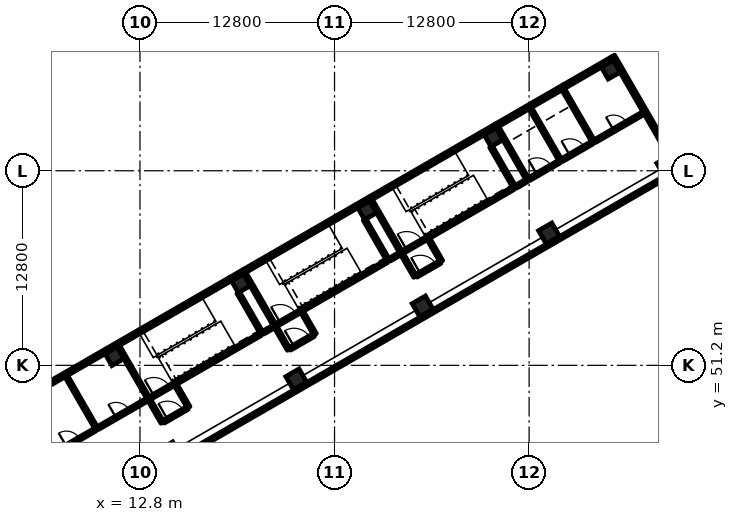
"""IFC4 building model, lengths in metres.
Left out: names, types, materials, properties, quantities, classifications, styles, units other than length and angle.
Written with IfcOpenShell. Run it as: python <this file> out.ifc"""

import sys

from ifc_helpers import new_model, si_unit, direction, frame, frame_2d, origin, origin_2d, place, context, subcontext, project, spatial, rectangle, extrude, element, fill, save


model = new_model("IFC4")
c1 = context("Model", 3, precision=1e-05, world=origin(), true_north=direction((0.0, 1.0)))
c2 = subcontext(c1, "Body", "Model", "MODEL_VIEW")
j1 = project(units=[si_unit("LENGTHUNIT", "METRE"), si_unit("PLANEANGLEUNIT", "RADIAN")], contexts=[c1])
p1 = place(None, origin())
s1 = spatial("IfcSite", under=j1, at=p1, CompositionType="ELEMENT")
p2 = place(p1, origin())
s2 = spatial("IfcBuilding", under=s1, at=p2, CompositionType="ELEMENT")
p3 = place(p2, frame((0.0, 0.0, 16.2)))
s3 = spatial("IfcBuildingStorey", under=s2, at=p3, CompositionType="ELEMENT", Elevation=16.2)
for number, where, z_axis, x_axis in (
    (1, (23.082, 50.277, 0.0), (0.0, 0.0, 1.0), (-0.5, 0.866, 0.0)),
    (2, (31.396, 55.077, 0.0), (0.0, 0.0, 1.0), (-0.5, 0.866, 0.0)),
    (3, (39.71, 59.877, 0.0), (0.0, 0.0, 1.0), (-0.5, 0.866, 0.0)),
):
    element("IfcColumn", number, at=place(p3, frame(where, z_axis=z_axis, x_axis=x_axis)), inside=s3, PredefinedType="COLUMN", context=c2, shape_type="SweptSolid", body=[
        extrude(rectangle(XDim=1.0, YDim=1.0, at=origin_2d()), origin(), (0.0, 0.0, 1.0), 5.4),
    ])
for number, where, z_axis, x_axis in (
    (4, (47.417, 64.327, 0.0), (0.0, 0.0, 1.0), (-0.5, 0.866, 0.0)),
    (5, (11.118, 51.799, 0.0), (0.0, 0.0, 1.0), (-0.5, 0.866, 0.0)),
    (6, (19.432, 56.599, 0.0), (0.0, 0.0, 1.0), (-0.5, 0.866, 0.0)),
    (7, (27.746, 61.399, 0.0), (0.0, 0.0, 1.0), (-0.5, 0.866, 0.0)),
    (8, (36.06, 66.199, 0.0), (0.0, 0.0, 1.0), (-0.5, 0.866, 0.0)),
    (9, (43.767, 70.649, 0.0), (0.0, 0.0, 1.0), (-0.5, 0.866, 0.0)),
):
    element("IfcColumn", number, at=place(p3, frame(where, z_axis=z_axis, x_axis=x_axis)), inside=s3, PredefinedType="COLUMN", context=c2, shape_type="SweptSolid", body=[
        extrude(rectangle(XDim=0.9, YDim=0.9, at=origin_2d()), origin(), (0.0, 0.0, 1.0), 5.4),
    ])
p4 = place(p3, frame((43.915, 71.542, 0.0), z_axis=(0.0, 0.0, 1.0), x_axis=(0.499999331568, -0.866025789703, 0.0)))
e10 = element("IfcWall", 10, at=p4, inside=s3, PredefinedType="SOLIDWALL", context=c2, shape_type="SweptSolid", body=[
    extrude(rectangle(XDim=8.625, YDim=0.25, at=frame_2d((4.312, 0.0))), origin(), (0.0, 0.0, 1.0), 5.0),
])
p5 = place(p3, frame((2.733, 47.622, 0.0), z_axis=(0.0, 0.0, 1.0), x_axis=(0.866025598446, 0.499999662836, 0.0)))
e11 = element("IfcWall", 11, at=p5, inside=s3, PredefinedType="SOLIDWALL", context=c2, shape_type="SweptSolid", body=[
    extrude(rectangle(XDim=18.5, YDim=0.25, at=frame_2d((9.25, 0.0))), origin(), (0.0, 0.0, 1.0), 5.0),
])
p6 = place(p3, frame((19.621, 57.372, 0.0), z_axis=(0.0, 0.0, 1.0), x_axis=(0.866021068297, 0.500007509209, 0.0)))
e12 = element("IfcWall", 12, at=p6, inside=s3, PredefinedType="SOLIDWALL", context=c2, shape_type="SweptSolid", body=[
    extrude(rectangle(XDim=8.6, YDim=0.25, at=frame_2d((4.3, 0.0))), origin(), (0.0, 0.0, 1.0), 5.0),
])
p7 = place(p3, frame((27.935, 62.172, 0.0), z_axis=(0.0, 0.0, 1.0), x_axis=(0.86604045752, 0.499973925258, 0.0)))
e13 = element("IfcWall", 13, at=p7, inside=s3, PredefinedType="SOLIDWALL", context=c2, shape_type="SweptSolid", body=[
    extrude(rectangle(XDim=8.6, YDim=0.25, at=frame_2d((4.3, 0.0))), origin(), (0.0, 0.0, 1.0), 5.0),
])
p8 = place(p3, frame((36.249, 66.972, 0.0), z_axis=(0.0, 0.0, 1.0), x_axis=(0.866009661879, 0.500027264788, 0.0)))
e14 = element("IfcWall", 14, at=p8, inside=s3, PredefinedType="SOLIDWALL", context=c2, shape_type="SweptSolid", body=[
    extrude(rectangle(XDim=5.2, YDim=0.25, at=frame_2d((2.6, 0.0))), origin(), (0.0, 0.0, 1.0), 5.0),
])
p9 = place(p3, frame((40.752, 69.572, 0.0), z_axis=(0.0, 0.0, 1.0), x_axis=(0.866018442252, 0.500012057535, 0.0)))
e15 = element("IfcWall", 15, at=p9, inside=s3, PredefinedType="SOLIDWALL", context=c2, shape_type="SweptSolid", body=[
    extrude(rectangle(XDim=3.6, YDim=0.25, at=frame_2d((1.8, 0.0))), origin(), (0.0, 0.0, 1.0), 5.0),
])
p10 = place(p9, frame((0.25, 0.0, 0.9)))
e16 = element("IfcOpeningElement", 16, at=p10, cuts=e15, PredefinedType="OPENING", context=c2, shape_type="SweptSolid", body=[
    extrude(rectangle(XDim=2.0, YDim=1.8, at=frame_2d((1.0, 0.9))), frame((0.0, 0.135, 0.0), z_axis=(0.0, -1.0, 0.0), x_axis=(1.0, 0.0, 0.0)), (0.0, 0.0, 1.0), 0.27),
])
for number, where, z_axis, x_axis in (
    (17, (18.755, 56.872, 0.0), (0.0, 0.0, 1.0), (0.866, 0.5, 0.0)),
    (18, (27.069, 61.672, 0.0), (0.0, 0.0, 1.0), (0.866, 0.5, 0.0)),
    (19, (35.383, 66.472, 0.0), (0.0, 0.0, 1.0), (0.866, 0.5, 0.0)),
):
    element("IfcWall", number, at=place(p3, frame(where, z_axis=z_axis, x_axis=x_axis)), inside=s3, PredefinedType="SOLIDWALL", context=c2, shape_type="SweptSolid", body=[
        extrude(rectangle(XDim=1.0, YDim=0.25, at=frame_2d((0.5, 0.0))), origin(), (0.0, 0.0, 1.0), 5.0),
    ])
p11 = place(p3, frame((13.369, 49.0, 0.0), z_axis=(0.0, 0.0, 1.0), x_axis=(-0.50002537861, 0.866010750942, 0.0)))
e20 = element("IfcWall", 20, at=p11, inside=s3, PredefinedType="SOLIDWALL", context=c2, shape_type="SweptSolid", body=[
    extrude(rectangle(XDim=4.0, YDim=0.2, at=frame_2d((2.0, 0.0))), origin(), (0.0, 0.0, 1.0), 5.0),
])
p12 = place(p3, frame((20.817, 53.299, 0.0), z_axis=(0.0, 0.0, 1.0), x_axis=(-0.49999285859, 0.86602952684, 0.0)))
e21 = element("IfcWall", 21, at=p12, inside=s3, PredefinedType="SOLIDWALL", context=c2, shape_type="SweptSolid", body=[
    extrude(rectangle(XDim=3.1, YDim=0.2, at=frame_2d((1.55, 0.0))), origin(), (0.0, 0.0, 1.0), 5.0),
])
p13 = place(p3, frame((21.683, 53.799, 0.0), z_axis=(0.0, 0.0, 1.0), x_axis=(-0.49999894854, 0.866026010844, 0.0)))
e22 = element("IfcWall", 22, at=p13, inside=s3, PredefinedType="SOLIDWALL", context=c2, shape_type="SweptSolid", body=[
    extrude(rectangle(XDim=4.0, YDim=0.2, at=frame_2d((2.0, 0.0))), origin(), (0.0, 0.0, 1.0), 5.0),
])
p14 = place(p3, frame((29.131, 58.099, 0.0), z_axis=(0.0, 0.0, 1.0), x_axis=(-0.49999285859, 0.86602952684, 0.0)))
e23 = element("IfcWall", 23, at=p14, inside=s3, PredefinedType="SOLIDWALL", context=c2, shape_type="SweptSolid", body=[
    extrude(rectangle(XDim=3.1, YDim=0.2, at=frame_2d((1.55, 0.0))), origin(), (0.0, 0.0, 1.0), 5.0),
])
p15 = place(p3, frame((29.997, 58.599, 0.0), z_axis=(0.0, 0.0, 1.0), x_axis=(-0.49999894854, 0.866026010844, 0.0)))
e24 = element("IfcWall", 24, at=p15, inside=s3, PredefinedType="SOLIDWALL", context=c2, shape_type="SweptSolid", body=[
    extrude(rectangle(XDim=4.0, YDim=0.2, at=frame_2d((2.0, 0.0))), origin(), (0.0, 0.0, 1.0), 5.0),
])
p16 = place(p3, frame((37.445, 62.899, 0.0), z_axis=(0.0, 0.0, 1.0), x_axis=(-0.500026960575, 0.86600983753, 0.0)))
e25 = element("IfcWall", 25, at=p16, inside=s3, PredefinedType="SOLIDWALL", context=c2, shape_type="SweptSolid", body=[
    extrude(rectangle(XDim=3.1, YDim=0.2, at=frame_2d((1.55, 0.0))), origin(), (0.0, 0.0, 1.0), 5.0),
])
p17 = place(p3, frame((13.456, 49.049, 0.0), z_axis=(0.0, 0.0, 1.0), x_axis=(0.866036909293, 0.499980071345, 0.0)))
e26 = element("IfcWall", 26, at=p17, inside=s3, PredefinedType="SOLIDWALL", context=c2, shape_type="SweptSolid", body=[
    extrude(rectangle(XDim=1.75, YDim=0.2, at=frame_2d((0.875, 0.0))), origin(), (0.0, 0.0, 1.0), 5.0),
])
p18 = place(p17, frame((0.3, 0.0, 0.0)))
e27 = element("IfcOpeningElement", 27, at=p18, cuts=e26, PredefinedType="OPENING", context=c2, shape_type="SweptSolid", body=[
    extrude(rectangle(XDim=1.2, YDim=2.1, at=frame_2d((0.6, 1.05))), frame((0.0, 0.11, 0.0), z_axis=(0.0, -1.0, 0.0), x_axis=(1.0, 0.0, 0.0)), (0.0, 0.0, 1.0), 0.22),
])
p19 = place(p3, frame((14.972, 49.924, 0.0), z_axis=(0.0, 0.0, 1.0), x_axis=(0.86601134256, 0.500024353964, 0.0)))
e28 = element("IfcWall", 28, at=p19, inside=s3, PredefinedType="SOLIDWALL", context=c2, shape_type="SweptSolid", body=[
    extrude(rectangle(XDim=6.65, YDim=0.2, at=frame_2d((3.325, 0.0))), origin(), (0.0, 0.0, 1.0), 5.0),
])
p20 = place(p3, frame((21.77, 53.849, 0.0), z_axis=(0.0, 0.0, 1.0), x_axis=(0.866002029911, 0.500040482552, 0.0)))
e29 = element("IfcWall", 29, at=p20, inside=s3, PredefinedType="SOLIDWALL", context=c2, shape_type="SweptSolid", body=[
    extrude(rectangle(XDim=1.75, YDim=0.2, at=frame_2d((0.875, 0.0))), origin(), (0.0, 0.0, 1.0), 5.0),
])
p21 = place(p20, frame((0.3, 0.0, 0.0)))
e30 = element("IfcOpeningElement", 30, at=p21, cuts=e29, PredefinedType="OPENING", context=c2, shape_type="SweptSolid", body=[
    extrude(rectangle(XDim=1.2, YDim=2.1, at=frame_2d((0.6, 1.05))), frame((0.0, 0.11, 0.0), z_axis=(0.0, -1.0, 0.0), x_axis=(1.0, 0.0, 0.0)), (0.0, 0.0, 1.0), 0.22),
])
p22 = place(p3, frame((23.285, 54.724, 0.0), z_axis=(0.0, 0.0, 1.0), x_axis=(0.866027239912, 0.49999681972, 0.0)))
e31 = element("IfcWall", 31, at=p22, inside=s3, PredefinedType="SOLIDWALL", context=c2, shape_type="SweptSolid", body=[
    extrude(rectangle(XDim=6.65, YDim=0.2, at=frame_2d((3.325, 0.0))), origin(), (0.0, 0.0, 1.0), 5.0),
])
p23 = place(p3, frame((30.084, 58.649, 0.0), z_axis=(0.0, 0.0, 1.0), x_axis=(0.866036909293, 0.499980071345, 0.0)))
e32 = element("IfcWall", 32, at=p23, inside=s3, PredefinedType="SOLIDWALL", context=c2, shape_type="SweptSolid", body=[
    extrude(rectangle(XDim=1.75, YDim=0.2, at=frame_2d((0.875, 0.0))), origin(), (0.0, 0.0, 1.0), 5.0),
])
p24 = place(p23, frame((0.3, 0.0, 0.0)))
e33 = element("IfcOpeningElement", 33, at=p24, cuts=e32, PredefinedType="OPENING", context=c2, shape_type="SweptSolid", body=[
    extrude(rectangle(XDim=1.2, YDim=2.1, at=frame_2d((0.6, 1.05))), frame((0.0, 0.11, 0.0), z_axis=(0.0, -1.0, 0.0), x_axis=(1.0, 0.0, 0.0)), (0.0, 0.0, 1.0), 0.22),
])
p25 = place(p3, frame((31.599, 59.524, 0.0), z_axis=(0.0, 0.0, 1.0), x_axis=(0.866027239912, 0.49999681972, 0.0)))
e34 = element("IfcWall", 34, at=p25, inside=s3, PredefinedType="SOLIDWALL", context=c2, shape_type="SweptSolid", body=[
    extrude(rectangle(XDim=6.65, YDim=0.2, at=frame_2d((3.325, 0.0))), origin(), (0.0, 0.0, 1.0), 5.0),
])
for number, where, z_axis, x_axis in (
    (35, (38.311, 63.399, 0.0), (0.0, 0.0, 1.0), (-0.5, 0.866, 0.0)),
    (36, (40.476, 64.649, 0.0), (0.0, 0.0, 1.0), (-0.5, 0.866, 0.0)),
    (37, (42.641, 65.899, 0.0), (0.0, 0.0, 1.0), (-0.5, 0.866, 0.0)),
):
    element("IfcWall", number, at=place(p3, frame(where, z_axis=z_axis, x_axis=x_axis)), inside=s3, PredefinedType="SOLIDWALL", context=c2, shape_type="SweptSolid", body=[
        extrude(rectangle(XDim=4.0, YDim=0.2, at=frame_2d((2.0, 0.0))), origin(), (0.0, 0.0, 1.0), 5.0),
    ])
p26 = place(p3, frame((38.398, 63.449, 0.0), z_axis=(0.0, 0.0, 1.0), x_axis=(0.86602648383, 0.499998129301, 0.0)))
e38 = element("IfcWall", 38, at=p26, inside=s3, PredefinedType="SOLIDWALL", context=c2, shape_type="SweptSolid", body=[
    extrude(rectangle(XDim=2.3, YDim=0.2, at=frame_2d((1.15, 0.0))), origin(), (0.0, 0.0, 1.0), 5.0),
])
p27 = place(p26, frame((0.6, 0.0, 0.0)))
e39 = element("IfcOpeningElement", 39, at=p27, cuts=e38, PredefinedType="OPENING", context=c2, shape_type="SweptSolid", body=[
    extrude(rectangle(XDim=1.1, YDim=2.1, at=frame_2d((0.55, 1.05))), frame((0.0, 0.11, 0.0), z_axis=(0.0, -1.0, 0.0), x_axis=(1.0, 0.0, 0.0)), (0.0, 0.0, 1.0), 0.22),
])
p28 = place(p3, frame((40.563, 64.699, 0.0), z_axis=(0.0, 0.0, 1.0), x_axis=(0.86602648383, 0.499998129301, 0.0)))
e40 = element("IfcWall", 40, at=p28, inside=s3, PredefinedType="SOLIDWALL", context=c2, shape_type="SweptSolid", body=[
    extrude(rectangle(XDim=2.3, YDim=0.2, at=frame_2d((1.15, 0.0))), origin(), (0.0, 0.0, 1.0), 5.0),
])
p29 = place(p28, frame((0.6, 0.0, 0.0)))
e41 = element("IfcOpeningElement", 41, at=p29, cuts=e40, PredefinedType="OPENING", context=c2, shape_type="SweptSolid", body=[
    extrude(rectangle(XDim=1.1, YDim=2.1, at=frame_2d((0.55, 1.05))), frame((0.0, 0.11, 0.0), z_axis=(0.0, -1.0, 0.0), x_axis=(1.0, 0.0, 0.0)), (0.0, 0.0, 1.0), 0.22),
])
for number, where, z_axis, x_axis in (
    (42, (14.27, 47.441, 0.0), (0.0, 0.0, 1.0), (-0.5, 0.866, 0.0)),
    (43, (16.001, 48.441, 0.0), (0.0, 0.0, 1.0), (-0.5, 0.866, 0.0)),
    (44, (22.583, 52.24, 0.0), (0.0, 0.0, 1.0), (-0.5, 0.866, 0.0)),
):
    element("IfcWall", number, at=place(p3, frame(where, z_axis=z_axis, x_axis=x_axis)), inside=s3, PredefinedType="PARTITIONING", context=c2, shape_type="SweptSolid", body=[
        extrude(rectangle(XDim=1.7, YDim=0.2, at=frame_2d((0.85, 0.0))), origin(), (0.0, 0.0, 1.0), 4.1),
    ])
p30 = place(p3, frame((24.315, 53.24, 0.0), z_axis=(0.0, 0.0, 1.0), x_axis=(-0.500000056704, 0.866025371046, 0.0)))
e45 = element("IfcWall", 45, at=p30, inside=s3, PredefinedType="PARTITIONING", context=c2, shape_type="SweptSolid", body=[
    extrude(rectangle(XDim=1.7, YDim=0.2, at=frame_2d((0.85, 0.0))), origin(), (0.0, 0.0, 1.0), 4.1),
])
for number, where, z_axis, x_axis in (
    (46, (30.897, 57.041, 0.0), (0.0, 0.0, 1.0), (-0.5, 0.866, 0.0)),
    (47, (32.629, 58.041, 0.0), (0.0, 0.0, 1.0), (-0.5, 0.866, 0.0)),
):
    element("IfcWall", number, at=place(p3, frame(where, z_axis=z_axis, x_axis=x_axis)), inside=s3, PredefinedType="PARTITIONING", context=c2, shape_type="SweptSolid", body=[
        extrude(rectangle(XDim=1.7, YDim=0.2, at=frame_2d((0.85, 0.0))), origin(), (0.0, 0.0, 1.0), 4.1),
    ])
p31 = place(p3, frame((14.356, 47.49, 0.0), z_axis=(0.0, 0.0, 1.0), x_axis=(0.865955154139, 0.50012165622, 0.0)))
e48 = element("IfcWall", 48, at=p31, inside=s3, PredefinedType="PARTITIONING", context=c2, shape_type="SweptSolid", body=[
    extrude(rectangle(XDim=1.8, YDim=0.2, at=frame_2d((0.9, 0.0))), origin(), (0.0, 0.0, 1.0), 4.1),
])
p32 = place(p31, frame((0.3, 0.0, 0.0)))
e49 = element("IfcOpeningElement", 49, at=p32, cuts=e48, PredefinedType="OPENING", context=c2, shape_type="SweptSolid", body=[
    extrude(rectangle(XDim=1.2, YDim=2.1, at=frame_2d((0.6, 1.05))), frame((0.0, 0.11, 0.0), z_axis=(0.0, -1.0, 0.0), x_axis=(1.0, 0.0, 0.0)), (0.0, 0.0, 1.0), 0.22),
])
p33 = place(p3, frame((22.67, 52.291, 0.0), z_axis=(0.0, 0.0, 1.0), x_axis=(0.865989075817, 0.500062916607, 0.0)))
e50 = element("IfcWall", 50, at=p33, inside=s3, PredefinedType="PARTITIONING", context=c2, shape_type="SweptSolid", body=[
    extrude(rectangle(XDim=1.8, YDim=0.2, at=frame_2d((0.9, 0.0))), origin(), (0.0, 0.0, 1.0), 4.1),
])
p34 = place(p33, frame((0.3, 0.0, 0.0)))
e51 = element("IfcOpeningElement", 51, at=p34, cuts=e50, PredefinedType="OPENING", context=c2, shape_type="SweptSolid", body=[
    extrude(rectangle(XDim=1.2, YDim=2.1, at=frame_2d((0.6, 1.05))), frame((0.0, 0.11, 0.0), z_axis=(0.0, -1.0, 0.0), x_axis=(1.0, 0.0, 0.0)), (0.0, 0.0, 1.0), 0.22),
])
p35 = place(p3, frame((30.984, 57.091, 0.0), z_axis=(0.0, 0.0, 1.0), x_axis=(0.866047807691, 0.499961193289, 0.0)))
e52 = element("IfcWall", 52, at=p35, inside=s3, PredefinedType="PARTITIONING", context=c2, shape_type="SweptSolid", body=[
    extrude(rectangle(XDim=1.8, YDim=0.2, at=frame_2d((0.9, 0.0))), origin(), (0.0, 0.0, 1.0), 4.1),
])
p36 = place(p35, frame((0.3, 0.0, 0.0)))
e53 = element("IfcOpeningElement", 53, at=p36, cuts=e52, PredefinedType="OPENING", context=c2, shape_type="SweptSolid", body=[
    extrude(rectangle(XDim=1.2, YDim=2.1, at=frame_2d((0.6, 1.05))), frame((0.0, 0.11, 0.0), z_axis=(0.0, -1.0, 0.0), x_axis=(1.0, 0.0, 0.0)), (0.0, 0.0, 1.0), 0.22),
])
p37 = place(p3, frame((9.949, 47.024, 0.0), z_axis=(0.0, 0.0, 1.0), x_axis=(-0.49999894854, 0.866026010844, 0.0)))
e54 = element("IfcWall", 54, at=p37, inside=s3, PredefinedType="PARTITIONING", context=c2, shape_type="SweptSolid", body=[
    extrude(rectangle(XDim=4.0, YDim=0.2, at=frame_2d((2.0, 0.0))), origin(), (0.0, 0.0, 1.0), 4.1),
])
p38 = place(p3, frame((6.917, 45.274, 0.0), z_axis=(0.0, 0.0, 1.0), x_axis=(0.866038511948, 0.499977295307, 0.0)))
e55 = element("IfcWall", 55, at=p38, inside=s3, PredefinedType="PARTITIONING", context=c2, shape_type="SweptSolid", body=[
    extrude(rectangle(XDim=3.4, YDim=0.2, at=frame_2d((1.7, 0.0))), origin(), (0.0, 0.0, 1.0), 4.1),
])
p39 = place(p38, frame((1.2, 0.0, 0.0)))
e56 = element("IfcOpeningElement", 56, at=p39, cuts=e55, PredefinedType="OPENING", context=c2, shape_type="SweptSolid", body=[
    extrude(rectangle(XDim=1.0, YDim=2.1, at=frame_2d((0.5, 1.05))), frame((0.0, 0.11, 0.0), z_axis=(0.0, -1.0, 0.0), x_axis=(1.0, 0.0, 0.0)), (0.0, 0.0, 1.0), 0.22),
])
p40 = place(p3, frame((10.035, 47.074, 0.0), z_axis=(0.0, 0.0, 1.0), x_axis=(0.866022959057, 0.500004234368, 0.0)))
e57 = element("IfcWall", 57, at=p40, inside=s3, PredefinedType="PARTITIONING", context=c2, shape_type="SweptSolid", body=[
    extrude(rectangle(XDim=3.75, YDim=0.2, at=frame_2d((1.875, 0.0))), origin(), (0.0, 0.0, 1.0), 4.1),
])
p41 = place(p40, frame((1.375, 0.0, 0.0)))
e58 = element("IfcOpeningElement", 58, at=p41, cuts=e57, PredefinedType="OPENING", context=c2, shape_type="SweptSolid", body=[
    extrude(rectangle(XDim=1.0, YDim=2.1, at=frame_2d((0.5, 1.05))), frame((0.0, 0.11, 0.0), z_axis=(0.0, -1.0, 0.0), x_axis=(1.0, 0.0, 0.0)), (0.0, 0.0, 1.0), 0.22),
])
p42 = place(p3, frame((42.728, 65.949, 0.0), z_axis=(0.0, 0.0, 1.0), x_axis=(0.866029545028, 0.499992827086, 0.0)))
e59 = element("IfcWall", 59, at=p42, inside=s3, PredefinedType="PARTITIONING", context=c2, shape_type="SweptSolid", body=[
    extrude(rectangle(XDim=3.7, YDim=0.2, at=frame_2d((1.85, 0.0))), origin(), (0.0, 0.0, 1.0), 4.1),
])
p43 = place(p42, frame((1.425, 0.0, 0.0)))
e60 = element("IfcOpeningElement", 60, at=p43, cuts=e59, PredefinedType="OPENING", context=c2, shape_type="SweptSolid", body=[
    extrude(rectangle(XDim=1.0, YDim=2.1, at=frame_2d((0.5, 1.05))), frame((0.0, 0.11, 0.0), z_axis=(0.0, -1.0, 0.0), x_axis=(1.0, 0.0, 0.0)), (0.0, 0.0, 1.0), 0.22),
])
p44 = place(p3, frame((6.983, 40.26, 0.0), z_axis=(0.0, 0.0, 1.0), x_axis=(0.866024244032, 0.500002008745, 0.0)))
e61 = element("IfcWall", 61, at=p44, inside=s3, PredefinedType="PARTITIONING", context=c2, shape_type="SweptSolid", body=[
    extrude(rectangle(XDim=47.5, YDim=0.2, at=frame_2d((23.75, 0.0))), origin(), (0.0, 0.0, 1.0), 4.1),
])
p45 = place(p3, frame((20.904, 53.349, 0.0), z_axis=(0.0, 0.0, 1.0), x_axis=(0.865961984968, 0.500109828528, 0.0)))
e62 = element("IfcWall", 62, at=p45, inside=s3, PredefinedType="PARTITIONING", context=c2, shape_type="SweptSolid", body=[
    extrude(rectangle(XDim=0.8, YDim=0.2, at=frame_2d((0.4, 0.0))), origin(), (0.0, 0.0, 1.0), 4.1),
])
p46 = place(p3, frame((29.218, 58.149, 0.0), z_axis=(0.0, 0.0, 1.0), x_axis=(0.866017831539, 0.500013115284, 0.0)))
e63 = element("IfcWall", 63, at=p46, inside=s3, PredefinedType="PARTITIONING", context=c2, shape_type="SweptSolid", body=[
    extrude(rectangle(XDim=0.8, YDim=0.2, at=frame_2d((0.4, 0.0))), origin(), (0.0, 0.0, 1.0), 4.1),
])
p47 = place(p3, frame((37.531, 62.949, 0.0), z_axis=(0.0, 0.0, 1.0), x_axis=(0.866094119867, 0.499880961361, 0.0)))
e64 = element("IfcWall", 64, at=p47, inside=s3, PredefinedType="PARTITIONING", context=c2, shape_type="SweptSolid", body=[
    extrude(rectangle(XDim=0.8, YDim=0.2, at=frame_2d((0.4, 0.0))), origin(), (0.0, 0.0, 1.0), 4.1),
])
p48 = place(p10, origin())
e65 = element("IfcWindow", 65, at=p48, inside=s3, PartitioningType="SINGLE_PANEL", PredefinedType="WINDOW", context=c2, shape_type="SweptSolid", body=[
    extrude(rectangle(XDim=2.0, YDim=1.8, at=frame_2d((1.0, 0.9))), frame((0.0, 0.03, 0.0), z_axis=(0.0, -1.0, 0.0), x_axis=(1.0, 0.0, 0.0)), (0.0, 0.0, 1.0), 0.06),
])
fill(e16, e65)
p49 = place(p18, origin())
e66 = element("IfcDoor", 66, at=p49, inside=s3, OperationType="SINGLE_SWING_LEFT", PredefinedType="DOOR", context=c2, shape_type="SweptSolid", body=[
    extrude(rectangle(XDim=1.2, YDim=2.1, at=frame_2d((0.6, 1.05))), frame((0.0, 0.025, 0.0), z_axis=(0.0, -1.0, 0.0), x_axis=(1.0, 0.0, 0.0)), (0.0, 0.0, 1.0), 0.05),
])
fill(e27, e66)
p50 = place(p21, origin())
e67 = element("IfcDoor", 67, at=p50, inside=s3, OperationType="SINGLE_SWING_LEFT", PredefinedType="DOOR", context=c2, shape_type="SweptSolid", body=[
    extrude(rectangle(XDim=1.2, YDim=2.1, at=frame_2d((0.6, 1.05))), frame((0.0, 0.025, 0.0), z_axis=(0.0, -1.0, 0.0), x_axis=(1.0, 0.0, 0.0)), (0.0, 0.0, 1.0), 0.05),
])
fill(e30, e67)
p51 = place(p24, origin())
e68 = element("IfcDoor", 68, at=p51, inside=s3, OperationType="SINGLE_SWING_LEFT", PredefinedType="DOOR", context=c2, shape_type="SweptSolid", body=[
    extrude(rectangle(XDim=1.2, YDim=2.1, at=frame_2d((0.6, 1.05))), frame((0.0, 0.025, 0.0), z_axis=(0.0, -1.0, 0.0), x_axis=(1.0, 0.0, 0.0)), (0.0, 0.0, 1.0), 0.05),
])
fill(e33, e68)
p52 = place(p27, origin())
e69 = element("IfcDoor", 69, at=p52, inside=s3, OperationType="DOUBLE_DOOR_SLIDING", PredefinedType="DOOR", context=c2, shape_type="SweptSolid", body=[
    extrude(rectangle(XDim=1.1, YDim=2.1, at=frame_2d((0.55, 1.05))), frame((0.0, 0.025, 0.0), z_axis=(0.0, -1.0, 0.0), x_axis=(1.0, 0.0, 0.0)), (0.0, 0.0, 1.0), 0.05),
])
fill(e39, e69)
p53 = place(p29, origin())
e70 = element("IfcDoor", 70, at=p53, inside=s3, OperationType="DOUBLE_DOOR_SLIDING", PredefinedType="DOOR", context=c2, shape_type="SweptSolid", body=[
    extrude(rectangle(XDim=1.1, YDim=2.1, at=frame_2d((0.55, 1.05))), frame((0.0, 0.025, 0.0), z_axis=(0.0, -1.0, 0.0), x_axis=(1.0, 0.0, 0.0)), (0.0, 0.0, 1.0), 0.05),
])
fill(e41, e70)
p54 = place(p32, origin())
e71 = element("IfcDoor", 71, at=p54, inside=s3, OperationType="SINGLE_SWING_LEFT", PredefinedType="DOOR", context=c2, shape_type="SweptSolid", body=[
    extrude(rectangle(XDim=1.2, YDim=2.1, at=frame_2d((0.6, 1.05))), frame((0.0, 0.025, 0.0), z_axis=(0.0, -1.0, 0.0), x_axis=(1.0, 0.0, 0.0)), (0.0, 0.0, 1.0), 0.05),
])
fill(e49, e71)
p55 = place(p34, origin())
e72 = element("IfcDoor", 72, at=p55, inside=s3, OperationType="SINGLE_SWING_LEFT", PredefinedType="DOOR", context=c2, shape_type="SweptSolid", body=[
    extrude(rectangle(XDim=1.2, YDim=2.1, at=frame_2d((0.6, 1.05))), frame((0.0, 0.025, 0.0), z_axis=(0.0, -1.0, 0.0), x_axis=(1.0, 0.0, 0.0)), (0.0, 0.0, 1.0), 0.05),
])
fill(e51, e72)
p56 = place(p36, origin())
e73 = element("IfcDoor", 73, at=p56, inside=s3, OperationType="SINGLE_SWING_LEFT", PredefinedType="DOOR", context=c2, shape_type="SweptSolid", body=[
    extrude(rectangle(XDim=1.2, YDim=2.1, at=frame_2d((0.6, 1.05))), frame((0.0, 0.025, 0.0), z_axis=(0.0, -1.0, 0.0), x_axis=(1.0, 0.0, 0.0)), (0.0, 0.0, 1.0), 0.05),
])
fill(e53, e73)
p57 = place(p39, origin())
e74 = element("IfcDoor", 74, at=p57, inside=s3, OperationType="SINGLE_SWING_LEFT", PredefinedType="DOOR", context=c2, shape_type="SweptSolid", body=[
    extrude(rectangle(XDim=1.0, YDim=2.1, at=frame_2d((0.5, 1.05))), frame((0.0, 0.025, 0.0), z_axis=(0.0, -1.0, 0.0), x_axis=(1.0, 0.0, 0.0)), (0.0, 0.0, 1.0), 0.05),
])
fill(e56, e74)
p58 = place(p41, origin())
e75 = element("IfcDoor", 75, at=p58, inside=s3, OperationType="SINGLE_SWING_LEFT", PredefinedType="DOOR", context=c2, shape_type="SweptSolid", body=[
    extrude(rectangle(XDim=1.0, YDim=2.1, at=frame_2d((0.5, 1.05))), frame((0.0, 0.025, 0.0), z_axis=(0.0, -1.0, 0.0), x_axis=(1.0, 0.0, 0.0)), (0.0, 0.0, 1.0), 0.05),
])
fill(e58, e75)
p59 = place(p43, origin())
e76 = element("IfcDoor", 76, at=p59, inside=s3, OperationType="SINGLE_SWING_LEFT", PredefinedType="DOOR", context=c2, shape_type="SweptSolid", body=[
    extrude(rectangle(XDim=1.0, YDim=2.1, at=frame_2d((0.5, 1.05))), frame((0.0, 0.025, 0.0), z_axis=(0.0, -1.0, 0.0), x_axis=(1.0, 0.0, 0.0)), (0.0, 0.0, 1.0), 0.05),
])
fill(e60, e76)
save(model, sys.argv[1])
